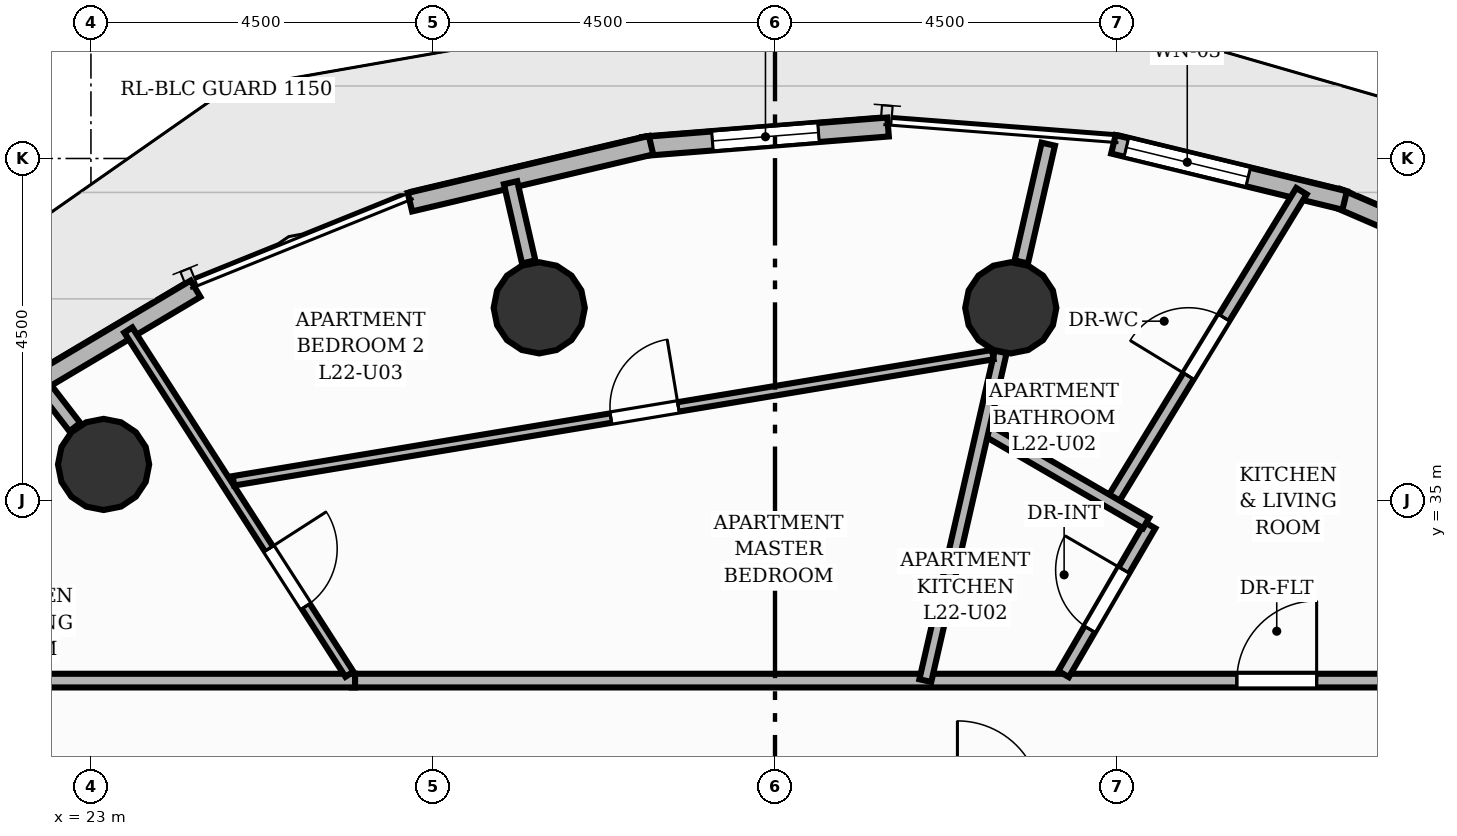
"""IFC4 building model, lengths in metres.
Left out: names, types, materials, properties, quantities, classifications, styles, units other than length and angle.
Written with IfcOpenShell. Run it as: python <this file> out.ifc"""

import sys

from ifc_helpers import new_model, si_unit, direction, frame, frame_2d, origin, origin_2d, place, context, subcontext, project, spatial, rectangle, circle, extrude, element, fill, save


model = new_model("IFC4")
c1 = context("Model", 3, precision=1e-05, world=origin(), true_north=direction((0.0, 1.0)))
c2 = subcontext(c1, "Body", "Model", "MODEL_VIEW")
j1 = project(units=[si_unit("LENGTHUNIT", "METRE"), si_unit("PLANEANGLEUNIT", "RADIAN")], contexts=[c1])
p1 = place(None, origin())
s1 = spatial("IfcSite", under=j1, at=p1, CompositionType="ELEMENT")
p2 = place(p1, origin())
s2 = spatial("IfcBuilding", under=s1, at=p2, CompositionType="ELEMENT")
p3 = place(p2, frame((0.0, 0.0, 77.28)))
s3 = spatial("IfcBuildingStorey", under=s2, at=p3, CompositionType="ELEMENT", Elevation=77.28)
for number, where, z_axis, x_axis in (
    (1, (35.102, 37.535, 0.0), (0.0, 0.0, 1.0), (1.0, 0.0, 0.0)),
    (2, (28.898, 37.535, 0.0), (0.0, 0.0, 1.0), (1.0, 0.0, 0.0)),
    (3, (23.167, 35.474, 0.0), (0.0, 0.0, 1.0), (1.0, 0.0, 0.0)),
):
    element("IfcColumn", number, at=place(p3, frame(where, z_axis=z_axis, x_axis=x_axis)), inside=s3, PredefinedType="COLUMN", context=c2, shape_type="SweptSolid", body=[
        extrude(circle(Radius=0.6, at=origin_2d()), origin(), (0.0, 0.0, 1.0), 3.2),
    ])
p4 = place(p3, frame((39.39, 38.982, 0.0), z_axis=(0.0, 0.0, 1.0), x_axis=(0.91829708806, -0.395891977766, 0.0)))
e4 = element("IfcWall", 4, at=p4, inside=s3, PredefinedType="SOLIDWALL", context=c2, shape_type="SweptSolid", body=[
    extrude(rectangle(XDim=3.061, YDim=0.25, at=frame_2d((1.53, 0.0))), origin(), (0.0, 0.0, 1.0), 2.96),
])
p5 = place(p3, frame((36.452, 39.687, 0.0), z_axis=(0.0, 0.0, 1.0), x_axis=(0.971748850292, -0.236017312833, 0.0)))
e5 = element("IfcWall", 5, at=p5, inside=s3, PredefinedType="SOLIDWALL", context=c2, shape_type="SweptSolid", body=[
    extrude(rectangle(XDim=3.131, YDim=0.25, at=frame_2d((1.565, 0.0))), origin(), (0.0, 0.0, 1.0), 2.96),
])
p6 = place(p5, frame((0.175, 0.0, 0.85)))
e6 = element("IfcOpeningElement", 6, at=p6, cuts=e5, PredefinedType="OPENING", context=c2, shape_type="SweptSolid", body=[
    extrude(rectangle(XDim=1.65, YDim=1.55, at=frame_2d((0.825, 0.775))), frame((0.0, 0.135, 0.0), z_axis=(0.0, -1.0, 0.0), x_axis=(1.0, 0.0, 0.0)), (0.0, 0.0, 1.0), 0.27),
])
p7 = place(p3, frame((30.262, 39.658, 0.0), z_axis=(0.0, 0.0, 1.0), x_axis=(0.996851873062, 0.079286462736, 0.0)))
e7 = element("IfcWall", 7, at=p7, inside=s3, PredefinedType="SOLIDWALL", context=c2, shape_type="SweptSolid", body=[
    extrude(rectangle(XDim=3.236, YDim=0.25, at=frame_2d((1.618, 0.0))), origin(), (0.0, 0.0, 1.0), 2.96),
])
p8 = place(p7, frame((0.918, 0.0, 0.85)))
e8 = element("IfcOpeningElement", 8, at=p8, cuts=e7, PredefinedType="OPENING", context=c2, shape_type="SweptSolid", body=[
    extrude(rectangle(XDim=1.4, YDim=1.55, at=frame_2d((0.7, 0.775))), frame((0.0, 0.135, 0.0), z_axis=(0.0, -1.0, 0.0), x_axis=(1.0, 0.0, 0.0)), (0.0, 0.0, 1.0), 0.27),
])
p9 = place(p3, frame((27.197, 38.925, 0.0), z_axis=(0.0, 0.0, 1.0), x_axis=(0.973185832187, 0.230020294824, 0.0)))
e9 = element("IfcWall", 9, at=p9, inside=s3, PredefinedType="SOLIDWALL", context=c2, shape_type="SweptSolid", body=[
    extrude(rectangle(XDim=3.26, YDim=0.25, at=frame_2d((1.63, 0.0))), origin(), (0.0, 0.0, 1.0), 2.96),
])
p10 = place(p3, frame((21.594, 36.132, 0.0), z_axis=(0.0, 0.0, 1.0), x_axis=(0.859543053771, 0.511063341196, 0.0)))
e10 = element("IfcWall", 10, at=p10, inside=s3, PredefinedType="SOLIDWALL", context=c2, shape_type="SweptSolid", body=[
    extrude(rectangle(XDim=3.236, YDim=0.25, at=frame_2d((1.618, 0.0))), origin(), (0.0, 0.0, 1.0), 2.96),
])
p11 = place(p3, frame((35.24, 38.139, 0.0), z_axis=(0.0, 0.0, 1.0), x_axis=(0.223333591652, 0.974742071955, 0.0)))
e11 = element("IfcWall", 11, at=p11, inside=s3, PredefinedType="PARTITIONING", context=c2, shape_type="SweptSolid", body=[
    extrude(rectangle(XDim=1.589, YDim=0.18, at=frame_2d((0.795, 0.0))), origin(), (0.0, 0.0, 1.0), 2.26),
])
p12 = place(p3, frame((28.76, 38.139, 0.0), z_axis=(0.0, 0.0, 1.0), x_axis=(-0.223308362472, 0.974747852139, 0.0)))
e12 = element("IfcWall", 12, at=p12, inside=s3, PredefinedType="PARTITIONING", context=c2, shape_type="SweptSolid", body=[
    extrude(rectangle(XDim=1.069, YDim=0.18, at=frame_2d((0.535, 0.0))), origin(), (0.0, 0.0, 1.0), 2.26),
])
p13 = place(p3, frame((22.788, 35.966, 0.0), z_axis=(0.0, 0.0, 1.0), x_axis=(-0.609945476355, 0.792443383387, 0.0)))
e13 = element("IfcWall", 13, at=p13, inside=s3, PredefinedType="PARTITIONING", context=c2, shape_type="SweptSolid", body=[
    extrude(rectangle(XDim=0.704, YDim=0.18, at=frame_2d((0.352, 0.0))), origin(), (0.0, 0.0, 1.0), 2.26),
])
p14 = place(p3, frame((26.431, 32.63, 0.0), z_axis=(0.0, 0.0, 1.0), x_axis=(1.0, 0.0, 0.0)))
e14 = element("IfcWall", 14, at=p14, inside=s3, PredefinedType="PARTITIONING", context=c2, shape_type="SweptSolid", body=[
    extrude(rectangle(XDim=16.199, YDim=0.18, at=frame_2d((8.099, 0.0))), origin(), (0.0, 0.0, 1.0), 2.955),
])
p15 = place(p14, frame((11.645, 0.0, 0.0)))
e15 = element("IfcOpeningElement", 15, at=p15, cuts=e14, PredefinedType="OPENING", context=c2, shape_type="SweptSolid", body=[
    extrude(rectangle(XDim=1.05, YDim=2.15, at=frame_2d((0.525, 1.075))), frame((0.0, 0.1, 0.0), z_axis=(0.0, -1.0, 0.0), x_axis=(1.0, 0.0, 0.0)), (0.0, 0.0, 1.0), 0.2),
])
p16 = place(p3, frame((21.43, 32.63, 0.0), z_axis=(0.0, 0.0, 1.0), x_axis=(1.0, 0.0, 0.0)))
e16 = element("IfcWall", 16, at=p16, inside=s3, PredefinedType="PARTITIONING", context=c2, shape_type="SweptSolid", body=[
    extrude(rectangle(XDim=5.045, YDim=0.18, at=frame_2d((2.522, 0.0))), origin(), (0.0, 0.0, 1.0), 2.955),
])
p17 = place(p3, frame((36.424, 34.971, 0.0), z_axis=(0.0, 0.0, 1.0), x_axis=(0.521036660125, 0.853534298553, 0.0)))
e17 = element("IfcWall", 17, at=p17, inside=s3, PredefinedType="PLUMBINGWALL", context=c2, shape_type="SweptSolid", body=[
    extrude(rectangle(XDim=4.803, YDim=0.16, at=frame_2d((2.401, 0.0))), origin(), (0.0, 0.0, 1.0), 2.641),
])
p18 = place(p17, frame((1.951, 0.0, 0.0)))
e18 = element("IfcOpeningElement", 18, at=p18, cuts=e17, PredefinedType="OPENING", context=c2, shape_type="SweptSolid", body=[
    extrude(rectangle(XDim=0.9, YDim=2.1, at=frame_2d((0.45, 1.05))), frame((0.0, 0.09, 0.0), z_axis=(0.0, -1.0, 0.0), x_axis=(1.0, 0.0, 0.0)), (0.0, 0.0, 1.0), 0.18),
])
p19 = place(p3, frame((35.797, 32.716, 0.0), z_axis=(0.0, 0.0, 1.0), x_axis=(0.50256985659, 0.864536603763, 0.0)))
e19 = element("IfcWall", 19, at=p19, inside=s3, PredefinedType="PLUMBINGWALL", context=c2, shape_type="SweptSolid", body=[
    extrude(rectangle(XDim=2.264, YDim=0.16, at=frame_2d((1.132, 0.0))), origin(), (0.0, 0.0, 1.0), 2.955),
])
p20 = place(p19, frame((0.682, 0.0, 0.0)))
e20 = element("IfcOpeningElement", 20, at=p20, cuts=e19, PredefinedType="OPENING", context=c2, shape_type="SweptSolid", body=[
    extrude(rectangle(XDim=0.9, YDim=2.1, at=frame_2d((0.45, 1.05))), frame((0.0, 0.09, 0.0), z_axis=(0.0, -1.0, 0.0), x_axis=(1.0, 0.0, 0.0)), (0.0, 0.0, 1.0), 0.18),
])
p21 = place(p3, frame((36.883, 34.704, 0.0), z_axis=(0.0, 0.0, 1.0), x_axis=(-0.864542002386, 0.502560569594, 0.0)))
e21 = element("IfcWall", 21, at=p21, inside=s3, PredefinedType="PLUMBINGWALL", context=c2, shape_type="SweptSolid", body=[
    extrude(rectangle(XDim=2.48, YDim=0.16, at=frame_2d((1.24, 0.0))), origin(), (0.0, 0.0, 1.0), 2.955),
])
p22 = place(p3, frame((33.978, 32.63, 0.0), z_axis=(0.0, 0.0, 1.0), x_axis=(0.223368533365, 0.974734065426, 0.0)))
e22 = element("IfcWall", 22, at=p22, inside=s3, PredefinedType="PLUMBINGWALL", context=c2, shape_type="SweptSolid", body=[
    extrude(rectangle(XDim=4.438, YDim=0.16, at=frame_2d((2.219, 0.0))), origin(), (0.0, 0.0, 1.0), 2.26),
])
p23 = place(p3, frame((23.491, 37.243, 0.0), z_axis=(0.0, 0.0, 1.0), x_axis=(0.540565030624, -0.841302233247, 0.0)))
e23 = element("IfcWall", 23, at=p23, inside=s3, PredefinedType="PARTITIONING", context=c2, shape_type="SweptSolid", body=[
    extrude(rectangle(XDim=5.383, YDim=0.125, at=frame_2d((2.691, 0.0))), origin(), (0.0, 0.0, 1.0), 2.955),
])
p24 = place(p23, frame((3.42, 0.0, 0.0)))
e24 = element("IfcOpeningElement", 24, at=p24, cuts=e23, PredefinedType="OPENING", context=c2, shape_type="SweptSolid", body=[
    extrude(rectangle(XDim=0.9, YDim=2.1, at=frame_2d((0.45, 1.05))), frame((0.0, 0.073, 0.0), z_axis=(0.0, -1.0, 0.0), x_axis=(1.0, 0.0, 0.0)), (0.0, 0.0, 1.0), 0.145),
])
p25 = place(p3, frame((24.875, 35.259, 0.0), z_axis=(0.0, 0.0, 1.0), x_axis=(0.986466792703, 0.163961174958, 0.0)))
e25 = element("IfcWall", 25, at=p25, inside=s3, PredefinedType="PARTITIONING", context=c2, shape_type="SweptSolid", body=[
    extrude(rectangle(XDim=10.128, YDim=0.125, at=frame_2d((5.064, 0.0))), origin(), (0.0, 0.0, 1.0), 2.955),
])
p26 = place(p25, frame((5.034, 0.0, 0.0)))
e26 = element("IfcOpeningElement", 26, at=p26, cuts=e25, PredefinedType="OPENING", context=c2, shape_type="SweptSolid", body=[
    extrude(rectangle(XDim=0.9, YDim=2.1, at=frame_2d((0.45, 1.05))), frame((0.0, 0.073, 0.0), z_axis=(0.0, -1.0, 0.0), x_axis=(1.0, 0.0, 0.0)), (0.0, 0.0, 1.0), 0.145),
])
p27 = place(p6, origin())
e27 = element("IfcWindow", 27, at=p27, inside=s3, PartitioningType="SINGLE_PANEL", PredefinedType="WINDOW", context=c2, shape_type="SweptSolid", body=[
    extrude(rectangle(XDim=1.65, YDim=1.55, at=frame_2d((0.825, 0.775))), frame((0.0, 0.03, 0.0), z_axis=(0.0, -1.0, 0.0), x_axis=(1.0, 0.0, 0.0)), (0.0, 0.0, 1.0), 0.06),
])
fill(e6, e27)
p28 = place(p8, origin())
e28 = element("IfcWindow", 28, at=p28, inside=s3, PartitioningType="SINGLE_PANEL", PredefinedType="WINDOW", context=c2, shape_type="SweptSolid", body=[
    extrude(rectangle(XDim=1.4, YDim=1.55, at=frame_2d((0.7, 0.775))), frame((0.0, 0.03, 0.0), z_axis=(0.0, -1.0, 0.0), x_axis=(1.0, 0.0, 0.0)), (0.0, 0.0, 1.0), 0.06),
])
fill(e8, e28)
p29 = place(p15, origin())
e29 = element("IfcDoor", 29, at=p29, inside=s3, OperationType="SINGLE_SWING_RIGHT", PredefinedType="DOOR", context=c2, shape_type="SweptSolid", body=[
    extrude(rectangle(XDim=1.05, YDim=2.15, at=frame_2d((0.525, 1.075))), frame((0.0, 0.025, 0.0), z_axis=(0.0, -1.0, 0.0), x_axis=(1.0, 0.0, 0.0)), (0.0, 0.0, 1.0), 0.05),
])
fill(e15, e29)
p30 = place(p18, origin())
e30 = element("IfcDoor", 30, at=p30, inside=s3, OperationType="SINGLE_SWING_LEFT", PredefinedType="DOOR", context=c2, shape_type="SweptSolid", body=[
    extrude(rectangle(XDim=0.9, YDim=2.1, at=frame_2d((0.45, 1.05))), frame((0.0, 0.025, 0.0), z_axis=(0.0, -1.0, 0.0), x_axis=(1.0, 0.0, 0.0)), (0.0, 0.0, 1.0), 0.05),
])
fill(e18, e30)
p31 = place(p20, origin())
e31 = element("IfcDoor", 31, at=p31, inside=s3, OperationType="SINGLE_SWING_RIGHT", PredefinedType="DOOR", context=c2, shape_type="SweptSolid", body=[
    extrude(rectangle(XDim=0.9, YDim=2.1, at=frame_2d((0.45, 1.05))), frame((0.0, 0.025, 0.0), z_axis=(0.0, -1.0, 0.0), x_axis=(1.0, 0.0, 0.0)), (0.0, 0.0, 1.0), 0.05),
])
fill(e20, e31)
p32 = place(p24, origin())
e32 = element("IfcDoor", 32, at=p32, inside=s3, OperationType="SINGLE_SWING_LEFT", PredefinedType="DOOR", context=c2, shape_type="SweptSolid", body=[
    extrude(rectangle(XDim=0.9, YDim=2.1, at=frame_2d((0.45, 1.05))), frame((0.0, 0.025, 0.0), z_axis=(0.0, -1.0, 0.0), x_axis=(1.0, 0.0, 0.0)), (0.0, 0.0, 1.0), 0.05),
])
fill(e24, e32)
p33 = place(p26, origin())
e33 = element("IfcDoor", 33, at=p33, inside=s3, OperationType="SINGLE_SWING_RIGHT", PredefinedType="DOOR", context=c2, shape_type="SweptSolid", body=[
    extrude(rectangle(XDim=0.9, YDim=2.1, at=frame_2d((0.45, 1.05))), frame((0.0, 0.025, 0.0), z_axis=(0.0, -1.0, 0.0), x_axis=(1.0, 0.0, 0.0)), (0.0, 0.0, 1.0), 0.05),
])
fill(e26, e33)
save(model, sys.argv[1])
